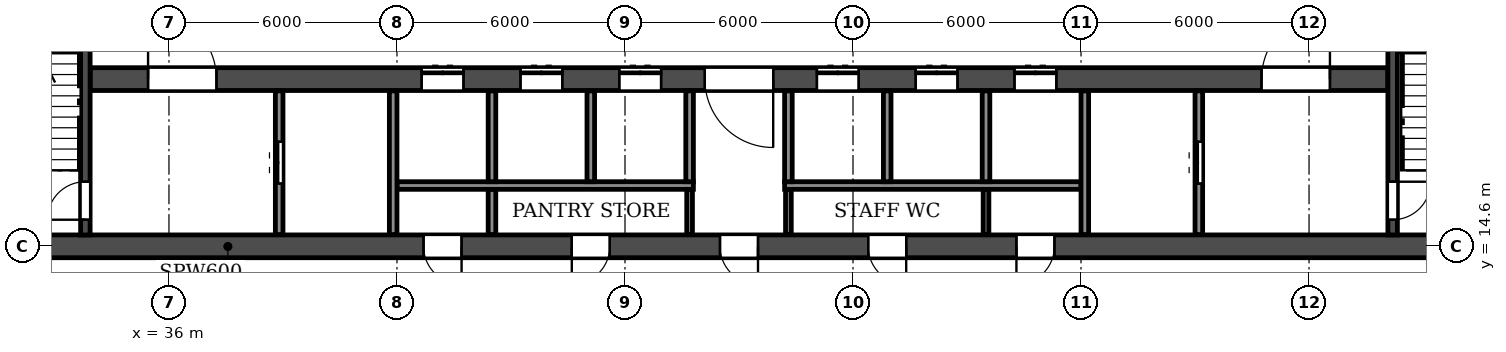
"""IFC4 building model, lengths in metres.
Left out: names, types, materials, properties, quantities, classifications, styles, units other than length and angle.
Written with IfcOpenShell. Run it as: python <this file> out.ifc"""

import sys

from ifc_helpers import new_model, si_unit, direction, frame, frame_2d, origin, place, context, subcontext, project, spatial, rectangle, extrude, element, fill, save


model = new_model("IFC4")
c1 = context("Model", 3, precision=1e-05, world=origin(), true_north=direction((0.0, 1.0)))
c2 = subcontext(c1, "Body", "Model", "MODEL_VIEW")
j1 = project(units=[si_unit("LENGTHUNIT", "METRE"), si_unit("PLANEANGLEUNIT", "RADIAN")], contexts=[c1])
p1 = place(None, origin())
s1 = spatial("IfcSite", under=j1, at=p1, CompositionType="ELEMENT")
p2 = place(p1, origin())
s2 = spatial("IfcBuilding", under=s1, at=p2, CompositionType="ELEMENT")
p3 = place(p2, frame((0.0, 0.0, 53.1)))
s3 = spatial("IfcBuildingStorey", under=s2, at=p3, CompositionType="ELEMENT", Elevation=53.1)
p4 = place(p3, frame((8.6, 14.6, 0.0), z_axis=(0.0, 0.0, 1.0), x_axis=(1.0, 0.0, 0.0)))
e1 = element("IfcWall", 1, at=p4, inside=s3, PredefinedType="SOLIDWALL", context=c2, shape_type="SweptSolid", body=[
    extrude(rectangle(XDim=84.8, YDim=0.6, at=frame_2d((42.4, 0.0))), origin(), (0.0, 0.0, 1.0), 3.05),
])
p5 = place(p4, frame((6.6, 0.0, 0.0)))
e2 = element("IfcOpeningElement", 2, at=p5, cuts=e1, PredefinedType="OPENING", context=c2, shape_type="SweptSolid", body=[
    extrude(rectangle(XDim=0.9, YDim=2.1, at=frame_2d((0.45, 1.05))), frame((0.0, 0.31, 0.0), z_axis=(0.0, -1.0, 0.0), x_axis=(1.0, 0.0, 0.0)), (0.0, 0.0, 1.0), 0.62),
])
p6 = place(p4, frame((10.3, 0.0, 0.0)))
e3 = element("IfcOpeningElement", 3, at=p6, cuts=e1, PredefinedType="OPENING", context=c2, shape_type="SweptSolid", body=[
    extrude(rectangle(XDim=1.0, YDim=2.1, at=frame_2d((0.5, 1.05))), frame((0.0, 0.31, 0.0), z_axis=(0.0, -1.0, 0.0), x_axis=(1.0, 0.0, 0.0)), (0.0, 0.0, 1.0), 0.62),
])
p7 = place(p4, frame((18.25, 0.0, 0.0)))
e4 = element("IfcOpeningElement", 4, at=p7, cuts=e1, PredefinedType="OPENING", context=c2, shape_type="SweptSolid", body=[
    extrude(rectangle(XDim=0.9, YDim=2.1, at=frame_2d((0.45, 1.05))), frame((0.0, 0.31, 0.0), z_axis=(0.0, -1.0, 0.0), x_axis=(1.0, 0.0, 0.0)), (0.0, 0.0, 1.0), 0.62),
])
p8 = place(p4, frame((22.8, 0.0, 0.0)))
e5 = element("IfcOpeningElement", 5, at=p8, cuts=e1, PredefinedType="OPENING", context=c2, shape_type="SweptSolid", body=[
    extrude(rectangle(XDim=1.0, YDim=2.1, at=frame_2d((0.5, 1.05))), frame((0.0, 0.31, 0.0), z_axis=(0.0, -1.0, 0.0), x_axis=(1.0, 0.0, 0.0)), (0.0, 0.0, 1.0), 0.62),
])
p9 = place(p4, frame((34.1, 0.0, 0.0)))
e6 = element("IfcOpeningElement", 6, at=p9, cuts=e1, PredefinedType="OPENING", context=c2, shape_type="SweptSolid", body=[
    extrude(rectangle(XDim=1.0, YDim=2.1, at=frame_2d((0.5, 1.05))), frame((0.0, 0.31, 0.0), z_axis=(0.0, -1.0, 0.0), x_axis=(1.0, 0.0, 0.0)), (0.0, 0.0, 1.0), 0.62),
])
p10 = place(p4, frame((38.0, 0.0, 0.0)))
e7 = element("IfcOpeningElement", 7, at=p10, cuts=e1, PredefinedType="OPENING", context=c2, shape_type="SweptSolid", body=[
    extrude(rectangle(XDim=1.0, YDim=2.1, at=frame_2d((0.5, 1.05))), frame((0.0, 0.31, 0.0), z_axis=(0.0, -1.0, 0.0), x_axis=(1.0, 0.0, 0.0)), (0.0, 0.0, 1.0), 0.62),
])
p11 = place(p4, frame((41.9, 0.0, 0.0)))
e8 = element("IfcOpeningElement", 8, at=p11, cuts=e1, PredefinedType="OPENING", context=c2, shape_type="SweptSolid", body=[
    extrude(rectangle(XDim=1.0, YDim=2.1, at=frame_2d((0.5, 1.05))), frame((0.0, 0.31, 0.0), z_axis=(0.0, -1.0, 0.0), x_axis=(1.0, 0.0, 0.0)), (0.0, 0.0, 1.0), 0.62),
])
p12 = place(p4, frame((45.8, 0.0, 0.0)))
e9 = element("IfcOpeningElement", 9, at=p12, cuts=e1, PredefinedType="OPENING", context=c2, shape_type="SweptSolid", body=[
    extrude(rectangle(XDim=1.0, YDim=2.1, at=frame_2d((0.5, 1.05))), frame((0.0, 0.31, 0.0), z_axis=(0.0, -1.0, 0.0), x_axis=(1.0, 0.0, 0.0)), (0.0, 0.0, 1.0), 0.62),
])
p13 = place(p4, frame((49.7, 0.0, 0.0)))
e10 = element("IfcOpeningElement", 10, at=p13, cuts=e1, PredefinedType="OPENING", context=c2, shape_type="SweptSolid", body=[
    extrude(rectangle(XDim=1.0, YDim=2.1, at=frame_2d((0.5, 1.05))), frame((0.0, 0.31, 0.0), z_axis=(0.0, -1.0, 0.0), x_axis=(1.0, 0.0, 0.0)), (0.0, 0.0, 1.0), 0.62),
])
p14 = place(p4, frame((61.0, 0.0, 0.0)))
e11 = element("IfcOpeningElement", 11, at=p14, cuts=e1, PredefinedType="OPENING", context=c2, shape_type="SweptSolid", body=[
    extrude(rectangle(XDim=1.0, YDim=2.1, at=frame_2d((0.5, 1.05))), frame((0.0, 0.31, 0.0), z_axis=(0.0, -1.0, 0.0), x_axis=(1.0, 0.0, 0.0)), (0.0, 0.0, 1.0), 0.62),
])
p15 = place(p4, frame((65.65, 0.0, 0.0)))
e12 = element("IfcOpeningElement", 12, at=p15, cuts=e1, PredefinedType="OPENING", context=c2, shape_type="SweptSolid", body=[
    extrude(rectangle(XDim=0.9, YDim=2.1, at=frame_2d((0.45, 1.05))), frame((0.0, 0.31, 0.0), z_axis=(0.0, -1.0, 0.0), x_axis=(1.0, 0.0, 0.0)), (0.0, 0.0, 1.0), 0.62),
])
p16 = place(p4, frame((73.5, 0.0, 0.0)))
e13 = element("IfcOpeningElement", 13, at=p16, cuts=e1, PredefinedType="OPENING", context=c2, shape_type="SweptSolid", body=[
    extrude(rectangle(XDim=1.0, YDim=2.1, at=frame_2d((0.5, 1.05))), frame((0.0, 0.31, 0.0), z_axis=(0.0, -1.0, 0.0), x_axis=(1.0, 0.0, 0.0)), (0.0, 0.0, 1.0), 0.62),
])
p17 = place(p4, frame((77.3, 0.0, 0.0)))
e14 = element("IfcOpeningElement", 14, at=p17, cuts=e1, PredefinedType="OPENING", context=c2, shape_type="SweptSolid", body=[
    extrude(rectangle(XDim=0.9, YDim=2.1, at=frame_2d((0.45, 1.05))), frame((0.0, 0.31, 0.0), z_axis=(0.0, -1.0, 0.0), x_axis=(1.0, 0.0, 0.0)), (0.0, 0.0, 1.0), 0.62),
])
p18 = place(p3, frame((33.925, 19.0, 0.0), z_axis=(0.0, 0.0, 1.0), x_axis=(1.0, 0.0, 0.0)))
e15 = element("IfcWall", 15, at=p18, inside=s3, PredefinedType="SOLIDWALL", context=c2, shape_type="SweptSolid", body=[
    extrude(rectangle(XDim=34.15, YDim=0.6, at=frame_2d((17.075, 0.0))), origin(), (0.0, 0.0, 1.0), 3.05),
])
p19 = place(p18, frame((16.175, 0.0, 0.0)))
e16 = element("IfcOpeningElement", 16, at=p19, cuts=e15, PredefinedType="OPENING", context=c2, shape_type="SweptSolid", body=[
    extrude(rectangle(XDim=1.8, YDim=2.1, at=frame_2d((0.9, 1.05))), frame((0.0, 0.31, 0.0), z_axis=(0.0, -1.0, 0.0), x_axis=(1.0, 0.0, 0.0)), (0.0, 0.0, 1.0), 0.62),
])
p20 = place(p18, frame((1.525, 0.0, 0.0)))
e17 = element("IfcOpeningElement", 17, at=p20, cuts=e15, PredefinedType="OPENING", context=c2, shape_type="SweptSolid", body=[
    extrude(rectangle(XDim=1.8, YDim=2.1, at=frame_2d((0.9, 1.05))), frame((0.0, 0.31, 0.0), z_axis=(0.0, -1.0, 0.0), x_axis=(1.0, 0.0, 0.0)), (0.0, 0.0, 1.0), 0.62),
])
p21 = place(p18, frame((8.725, 0.0, 0.0)))
e18 = element("IfcOpeningElement", 18, at=p21, cuts=e15, PredefinedType="OPENING", context=c2, shape_type="SweptSolid", body=[
    extrude(rectangle(XDim=1.1, YDim=2.1, at=frame_2d((0.55, 1.05))), frame((0.0, 0.31, 0.0), z_axis=(0.0, -1.0, 0.0), x_axis=(1.0, 0.0, 0.0)), (0.0, 0.0, 1.0), 0.62),
])
p22 = place(p18, frame((11.325, 0.0, 0.0)))
e19 = element("IfcOpeningElement", 19, at=p22, cuts=e15, PredefinedType="OPENING", context=c2, shape_type="SweptSolid", body=[
    extrude(rectangle(XDim=1.1, YDim=2.1, at=frame_2d((0.55, 1.05))), frame((0.0, 0.31, 0.0), z_axis=(0.0, -1.0, 0.0), x_axis=(1.0, 0.0, 0.0)), (0.0, 0.0, 1.0), 0.62),
])
p23 = place(p18, frame((13.925, 0.0, 0.0)))
e20 = element("IfcOpeningElement", 20, at=p23, cuts=e15, PredefinedType="OPENING", context=c2, shape_type="SweptSolid", body=[
    extrude(rectangle(XDim=1.1, YDim=2.1, at=frame_2d((0.55, 1.05))), frame((0.0, 0.31, 0.0), z_axis=(0.0, -1.0, 0.0), x_axis=(1.0, 0.0, 0.0)), (0.0, 0.0, 1.0), 0.62),
])
p24 = place(p18, frame((19.125, 0.0, 0.0)))
e21 = element("IfcOpeningElement", 21, at=p24, cuts=e15, PredefinedType="OPENING", context=c2, shape_type="SweptSolid", body=[
    extrude(rectangle(XDim=1.1, YDim=2.1, at=frame_2d((0.55, 1.05))), frame((0.0, 0.31, 0.0), z_axis=(0.0, -1.0, 0.0), x_axis=(1.0, 0.0, 0.0)), (0.0, 0.0, 1.0), 0.62),
])
p25 = place(p18, frame((21.725, 0.0, 0.0)))
e22 = element("IfcOpeningElement", 22, at=p25, cuts=e15, PredefinedType="OPENING", context=c2, shape_type="SweptSolid", body=[
    extrude(rectangle(XDim=1.1, YDim=2.1, at=frame_2d((0.55, 1.05))), frame((0.0, 0.31, 0.0), z_axis=(0.0, -1.0, 0.0), x_axis=(1.0, 0.0, 0.0)), (0.0, 0.0, 1.0), 0.62),
])
p26 = place(p18, frame((24.325, 0.0, 0.0)))
e23 = element("IfcOpeningElement", 23, at=p26, cuts=e15, PredefinedType="OPENING", context=c2, shape_type="SweptSolid", body=[
    extrude(rectangle(XDim=1.1, YDim=2.1, at=frame_2d((0.55, 1.05))), frame((0.0, 0.31, 0.0), z_axis=(0.0, -1.0, 0.0), x_axis=(1.0, 0.0, 0.0)), (0.0, 0.0, 1.0), 0.62),
])
p27 = place(p18, frame((30.825, 0.0, 0.0)))
e24 = element("IfcOpeningElement", 24, at=p27, cuts=e15, PredefinedType="OPENING", context=c2, shape_type="SweptSolid", body=[
    extrude(rectangle(XDim=1.8, YDim=2.1, at=frame_2d((0.9, 1.05))), frame((0.0, 0.31, 0.0), z_axis=(0.0, -1.0, 0.0), x_axis=(1.0, 0.0, 0.0)), (0.0, 0.0, 1.0), 0.62),
])
p28 = place(p3, frame((33.8, 14.9, 0.0), z_axis=(0.0, 0.0, 1.0), x_axis=(0.0, 1.0, 0.0)))
e25 = element("IfcWall", 25, at=p28, inside=s3, PredefinedType="SOLIDWALL", context=c2, shape_type="SweptSolid", body=[
    extrude(rectangle(XDim=7.575, YDim=0.25, at=frame_2d((3.788, 0.0))), origin(), (0.0, 0.0, 1.0), 3.05),
])
p29 = place(p28, frame((0.4, 0.0, 0.0)))
e26 = element("IfcOpeningElement", 26, at=p29, cuts=e25, PredefinedType="OPENING", context=c2, shape_type="SweptSolid", body=[
    extrude(rectangle(XDim=1.0, YDim=2.1, at=frame_2d((0.5, 1.05))), frame((0.0, 0.135, 0.0), z_axis=(0.0, -1.0, 0.0), x_axis=(1.0, 0.0, 0.0)), (0.0, 0.0, 1.0), 0.27),
])
p30 = place(p3, frame((68.2, 14.9, 0.0), z_axis=(0.0, 0.0, 1.0), x_axis=(0.0, 1.0, 0.0)))
e27 = element("IfcWall", 27, at=p30, inside=s3, PredefinedType="SOLIDWALL", context=c2, shape_type="SweptSolid", body=[
    extrude(rectangle(XDim=7.575, YDim=0.25, at=frame_2d((3.788, 0.0))), origin(), (0.0, 0.0, 1.0), 3.05),
])
p31 = place(p30, frame((0.4, 0.0, 0.0)))
e28 = element("IfcOpeningElement", 28, at=p31, cuts=e27, PredefinedType="OPENING", context=c2, shape_type="SweptSolid", body=[
    extrude(rectangle(XDim=1.0, YDim=2.1, at=frame_2d((0.5, 1.05))), frame((0.0, 0.135, 0.0), z_axis=(0.0, -1.0, 0.0), x_axis=(1.0, 0.0, 0.0)), (0.0, 0.0, 1.0), 0.27),
])
for number, where, z_axis, x_axis in (
    (29, (49.7, 14.91, 0.0), (0.0, 0.0, 1.0), (0.0, 1.0, 0.0)),
    (30, (52.3, 14.91, 0.0), (0.0, 0.0, 1.0), (0.0, 1.0, 0.0)),
    (31, (57.5, 14.91, 0.0), (0.0, 0.0, 1.0), (0.0, 1.0, 0.0)),
):
    element("IfcWall", number, at=place(p3, frame(where, z_axis=z_axis, x_axis=x_axis)), inside=s3, PredefinedType="PARTITIONING", context=c2, shape_type="SweptSolid", body=[
        extrude(rectangle(XDim=1.19, YDim=0.15, at=frame_2d((0.595, 0.0))), origin(), (0.0, 0.0, 1.0), 3.05),
    ])
p32 = place(p3, frame((44.5, 14.91, 0.0), z_axis=(0.0, 0.0, 1.0), x_axis=(0.0, 1.0, 0.0)))
e32 = element("IfcWall", 32, at=p32, inside=s3, PredefinedType="PARTITIONING", context=c2, shape_type="SweptSolid", body=[
    extrude(rectangle(XDim=1.19, YDim=0.2, at=frame_2d((0.595, 0.0))), origin(), (0.0, 0.0, 1.0), 3.05),
])
for number, where, z_axis, x_axis in (
    (33, (42.0, 16.2, 0.0), (0.0, 0.0, 1.0), (1.0, 0.0, 0.0)),
    (34, (52.2, 16.2, 0.0), (0.0, 0.0, 1.0), (1.0, 0.0, 0.0)),
):
    element("IfcWall", number, at=place(p3, frame(where, z_axis=z_axis, x_axis=x_axis)), inside=s3, PredefinedType="PARTITIONING", context=c2, shape_type="SweptSolid", body=[
        extrude(rectangle(XDim=7.8, YDim=0.2, at=frame_2d((3.9, 0.0))), origin(), (0.0, 0.0, 1.0), 3.05),
    ])
p33 = place(p3, frame((38.9, 14.91, 0.0), z_axis=(0.0, 0.0, 1.0), x_axis=(0.0, 1.0, 0.0)))
e35 = element("IfcWall", 35, at=p33, inside=s3, PredefinedType="PARTITIONING", context=c2, shape_type="SweptSolid", body=[
    extrude(rectangle(XDim=3.78, YDim=0.2, at=frame_2d((1.89, 0.0))), origin(), (0.0, 0.0, 1.0), 3.05),
])
p34 = place(p33, frame((1.34, 0.0, 0.0)))
e36 = element("IfcOpeningElement", 36, at=p34, cuts=e35, PredefinedType="OPENING", context=c2, shape_type="SweptSolid", body=[
    extrude(rectangle(XDim=1.1, YDim=2.1, at=frame_2d((0.55, 1.05))), frame((0.0, 0.11, 0.0), z_axis=(0.0, -1.0, 0.0), x_axis=(1.0, 0.0, 0.0)), (0.0, 0.0, 1.0), 0.22),
])
p35 = place(p3, frame((41.9, 14.91, 0.0), z_axis=(0.0, 0.0, 1.0), x_axis=(0.0, 1.0, 0.0)))
e37 = element("IfcWall", 37, at=p35, inside=s3, PredefinedType="PARTITIONING", context=c2, shape_type="SweptSolid", body=[
    extrude(rectangle(XDim=3.78, YDim=0.2, at=frame_2d((1.89, 0.0))), origin(), (0.0, 0.0, 1.0), 3.05),
])
for number, where, z_axis, x_axis in (
    (38, (44.5, 16.3, 0.0), (0.0, 0.0, 1.0), (0.0, 1.0, 0.0)),
    (39, (47.1, 16.3, 0.0), (0.0, 0.0, 1.0), (0.0, 1.0, 0.0)),
    (40, (49.7, 16.3, 0.0), (0.0, 0.0, 1.0), (0.0, 1.0, 0.0)),
    (41, (52.3, 16.3, 0.0), (0.0, 0.0, 1.0), (0.0, 1.0, 0.0)),
    (42, (54.9, 16.3, 0.0), (0.0, 0.0, 1.0), (0.0, 1.0, 0.0)),
    (43, (57.5, 16.3, 0.0), (0.0, 0.0, 1.0), (0.0, 1.0, 0.0)),
):
    element("IfcWall", number, at=place(p3, frame(where, z_axis=z_axis, x_axis=x_axis)), inside=s3, PredefinedType="PARTITIONING", context=c2, shape_type="SweptSolid", body=[
        extrude(rectangle(XDim=2.39, YDim=0.2, at=frame_2d((1.195, 0.0))), origin(), (0.0, 0.0, 1.0), 3.05),
    ])
p36 = place(p3, frame((60.1, 14.91, 0.0), z_axis=(0.0, 0.0, 1.0), x_axis=(0.0, 1.0, 0.0)))
e44 = element("IfcWall", 44, at=p36, inside=s3, PredefinedType="PARTITIONING", context=c2, shape_type="SweptSolid", body=[
    extrude(rectangle(XDim=3.78, YDim=0.2, at=frame_2d((1.89, 0.0))), origin(), (0.0, 0.0, 1.0), 3.05),
])
p37 = place(p3, frame((63.1, 14.91, 0.0), z_axis=(0.0, 0.0, 1.0), x_axis=(0.0, 1.0, 0.0)))
e45 = element("IfcWall", 45, at=p37, inside=s3, PredefinedType="PARTITIONING", context=c2, shape_type="SweptSolid", body=[
    extrude(rectangle(XDim=3.78, YDim=0.2, at=frame_2d((1.89, 0.0))), origin(), (0.0, 0.0, 1.0), 3.05),
])
p38 = place(p37, frame((1.34, 0.0, 0.0)))
e46 = element("IfcOpeningElement", 46, at=p38, cuts=e45, PredefinedType="OPENING", context=c2, shape_type="SweptSolid", body=[
    extrude(rectangle(XDim=1.1, YDim=2.1, at=frame_2d((0.55, 1.05))), frame((0.0, 0.11, 0.0), z_axis=(0.0, -1.0, 0.0), x_axis=(1.0, 0.0, 0.0)), (0.0, 0.0, 1.0), 0.22),
])
p39 = place(p9, frame((1.0, 0.0, 0.0), z_axis=(0.0, 0.0, 1.0), x_axis=(-1.0, 0.0, 0.0)))
e47 = element("IfcDoor", 47, at=p39, inside=s3, OperationType="SINGLE_SWING_LEFT", PredefinedType="DOOR", context=c2, shape_type="SweptSolid", body=[
    extrude(rectangle(XDim=1.0, YDim=2.1, at=frame_2d((0.5, 1.05))), frame((0.0, 0.025, 0.0), z_axis=(0.0, -1.0, 0.0), x_axis=(1.0, 0.0, 0.0)), (0.0, 0.0, 1.0), 0.05),
])
fill(e6, e47)
p40 = place(p10, frame((1.0, 0.0, 0.0), z_axis=(0.0, 0.0, 1.0), x_axis=(-1.0, 0.0, 0.0)))
e48 = element("IfcDoor", 48, at=p40, inside=s3, OperationType="SINGLE_SWING_RIGHT", PredefinedType="DOOR", context=c2, shape_type="SweptSolid", body=[
    extrude(rectangle(XDim=1.0, YDim=2.1, at=frame_2d((0.5, 1.05))), frame((0.0, 0.025, 0.0), z_axis=(0.0, -1.0, 0.0), x_axis=(1.0, 0.0, 0.0)), (0.0, 0.0, 1.0), 0.05),
])
fill(e7, e48)
p41 = place(p11, frame((1.0, 0.0, 0.0), z_axis=(0.0, 0.0, 1.0), x_axis=(-1.0, 0.0, 0.0)))
e49 = element("IfcDoor", 49, at=p41, inside=s3, OperationType="SINGLE_SWING_LEFT", PredefinedType="DOOR", context=c2, shape_type="SweptSolid", body=[
    extrude(rectangle(XDim=1.0, YDim=2.1, at=frame_2d((0.5, 1.05))), frame((0.0, 0.025, 0.0), z_axis=(0.0, -1.0, 0.0), x_axis=(1.0, 0.0, 0.0)), (0.0, 0.0, 1.0), 0.05),
])
fill(e8, e49)
p42 = place(p12, frame((1.0, 0.0, 0.0), z_axis=(0.0, 0.0, 1.0), x_axis=(-1.0, 0.0, 0.0)))
e50 = element("IfcDoor", 50, at=p42, inside=s3, OperationType="SINGLE_SWING_LEFT", PredefinedType="DOOR", context=c2, shape_type="SweptSolid", body=[
    extrude(rectangle(XDim=1.0, YDim=2.1, at=frame_2d((0.5, 1.05))), frame((0.0, 0.025, 0.0), z_axis=(0.0, -1.0, 0.0), x_axis=(1.0, 0.0, 0.0)), (0.0, 0.0, 1.0), 0.05),
])
fill(e9, e50)
p43 = place(p13, frame((1.0, 0.0, 0.0), z_axis=(0.0, 0.0, 1.0), x_axis=(-1.0, 0.0, 0.0)))
e51 = element("IfcDoor", 51, at=p43, inside=s3, OperationType="SINGLE_SWING_RIGHT", PredefinedType="DOOR", context=c2, shape_type="SweptSolid", body=[
    extrude(rectangle(XDim=1.0, YDim=2.1, at=frame_2d((0.5, 1.05))), frame((0.0, 0.025, 0.0), z_axis=(0.0, -1.0, 0.0), x_axis=(1.0, 0.0, 0.0)), (0.0, 0.0, 1.0), 0.05),
])
fill(e10, e51)
p44 = place(p38, origin())
e52 = element("IfcDoor", 52, at=p44, inside=s3, OperationType="DOUBLE_DOOR_SLIDING", PredefinedType="DOOR", context=c2, shape_type="SweptSolid", body=[
    extrude(rectangle(XDim=1.1, YDim=2.1, at=frame_2d((0.55, 1.05))), frame((0.0, 0.025, 0.0), z_axis=(0.0, -1.0, 0.0), x_axis=(1.0, 0.0, 0.0)), (0.0, 0.0, 1.0), 0.05),
])
fill(e46, e52)
p45 = place(p31, frame((1.0, 0.0, 0.0), z_axis=(0.0, 0.0, 1.0), x_axis=(-1.0, 0.0, 0.0)))
e53 = element("IfcDoor", 53, at=p45, inside=s3, OperationType="SINGLE_SWING_LEFT", PredefinedType="DOOR", context=c2, shape_type="SweptSolid", body=[
    extrude(rectangle(XDim=1.0, YDim=2.1, at=frame_2d((0.5, 1.05))), frame((0.0, 0.025, 0.0), z_axis=(0.0, -1.0, 0.0), x_axis=(1.0, 0.0, 0.0)), (0.0, 0.0, 1.0), 0.05),
])
fill(e28, e53)
p46 = place(p29, origin())
e54 = element("IfcDoor", 54, at=p46, inside=s3, OperationType="SINGLE_SWING_LEFT", PredefinedType="DOOR", context=c2, shape_type="SweptSolid", body=[
    extrude(rectangle(XDim=1.0, YDim=2.1, at=frame_2d((0.5, 1.05))), frame((0.0, 0.025, 0.0), z_axis=(0.0, -1.0, 0.0), x_axis=(1.0, 0.0, 0.0)), (0.0, 0.0, 1.0), 0.05),
])
fill(e26, e54)
p47 = place(p34, origin())
e55 = element("IfcDoor", 55, at=p47, inside=s3, OperationType="DOUBLE_DOOR_SLIDING", PredefinedType="DOOR", context=c2, shape_type="SweptSolid", body=[
    extrude(rectangle(XDim=1.1, YDim=2.1, at=frame_2d((0.55, 1.05))), frame((0.0, 0.025, 0.0), z_axis=(0.0, -1.0, 0.0), x_axis=(1.0, 0.0, 0.0)), (0.0, 0.0, 1.0), 0.05),
])
fill(e36, e55)
p48 = place(p19, frame((1.8, 0.0, 0.0), z_axis=(0.0, 0.0, 1.0), x_axis=(-1.0, 0.0, 0.0)))
e56 = element("IfcDoor", 56, at=p48, inside=s3, OperationType="DOUBLE_DOOR_SINGLE_SWING", PredefinedType="DOOR", context=c2, shape_type="SweptSolid", body=[
    extrude(rectangle(XDim=1.8, YDim=2.1, at=frame_2d((0.9, 1.05))), frame((0.0, 0.025, 0.0), z_axis=(0.0, -1.0, 0.0), x_axis=(1.0, 0.0, 0.0)), (0.0, 0.0, 1.0), 0.05),
])
fill(e16, e56)
p49 = place(p20, origin())
e57 = element("IfcDoor", 57, at=p49, inside=s3, OperationType="DOUBLE_DOOR_SINGLE_SWING", PredefinedType="DOOR", context=c2, shape_type="SweptSolid", body=[
    extrude(rectangle(XDim=1.8, YDim=2.1, at=frame_2d((0.9, 1.05))), frame((0.0, 0.025, 0.0), z_axis=(0.0, -1.0, 0.0), x_axis=(1.0, 0.0, 0.0)), (0.0, 0.0, 1.0), 0.05),
])
fill(e17, e57)
p50 = place(p21, origin())
e58 = element("IfcDoor", 58, at=p50, inside=s3, OperationType="DOUBLE_DOOR_SLIDING", PredefinedType="DOOR", context=c2, shape_type="SweptSolid", body=[
    extrude(rectangle(XDim=1.1, YDim=2.1, at=frame_2d((0.55, 1.05))), frame((0.0, 0.025, 0.0), z_axis=(0.0, -1.0, 0.0), x_axis=(1.0, 0.0, 0.0)), (0.0, 0.0, 1.0), 0.05),
])
fill(e18, e58)
p51 = place(p22, origin())
e59 = element("IfcDoor", 59, at=p51, inside=s3, OperationType="DOUBLE_DOOR_SLIDING", PredefinedType="DOOR", context=c2, shape_type="SweptSolid", body=[
    extrude(rectangle(XDim=1.1, YDim=2.1, at=frame_2d((0.55, 1.05))), frame((0.0, 0.025, 0.0), z_axis=(0.0, -1.0, 0.0), x_axis=(1.0, 0.0, 0.0)), (0.0, 0.0, 1.0), 0.05),
])
fill(e19, e59)
p52 = place(p23, origin())
e60 = element("IfcDoor", 60, at=p52, inside=s3, OperationType="DOUBLE_DOOR_SLIDING", PredefinedType="DOOR", context=c2, shape_type="SweptSolid", body=[
    extrude(rectangle(XDim=1.1, YDim=2.1, at=frame_2d((0.55, 1.05))), frame((0.0, 0.025, 0.0), z_axis=(0.0, -1.0, 0.0), x_axis=(1.0, 0.0, 0.0)), (0.0, 0.0, 1.0), 0.05),
])
fill(e20, e60)
p53 = place(p24, origin())
e61 = element("IfcDoor", 61, at=p53, inside=s3, OperationType="DOUBLE_DOOR_SLIDING", PredefinedType="DOOR", context=c2, shape_type="SweptSolid", body=[
    extrude(rectangle(XDim=1.1, YDim=2.1, at=frame_2d((0.55, 1.05))), frame((0.0, 0.025, 0.0), z_axis=(0.0, -1.0, 0.0), x_axis=(1.0, 0.0, 0.0)), (0.0, 0.0, 1.0), 0.05),
])
fill(e21, e61)
p54 = place(p25, origin())
e62 = element("IfcDoor", 62, at=p54, inside=s3, OperationType="DOUBLE_DOOR_SLIDING", PredefinedType="DOOR", context=c2, shape_type="SweptSolid", body=[
    extrude(rectangle(XDim=1.1, YDim=2.1, at=frame_2d((0.55, 1.05))), frame((0.0, 0.025, 0.0), z_axis=(0.0, -1.0, 0.0), x_axis=(1.0, 0.0, 0.0)), (0.0, 0.0, 1.0), 0.05),
])
fill(e22, e62)
p55 = place(p26, origin())
e63 = element("IfcDoor", 63, at=p55, inside=s3, OperationType="DOUBLE_DOOR_SLIDING", PredefinedType="DOOR", context=c2, shape_type="SweptSolid", body=[
    extrude(rectangle(XDim=1.1, YDim=2.1, at=frame_2d((0.55, 1.05))), frame((0.0, 0.025, 0.0), z_axis=(0.0, -1.0, 0.0), x_axis=(1.0, 0.0, 0.0)), (0.0, 0.0, 1.0), 0.05),
])
fill(e23, e63)
p56 = place(p27, origin())
e64 = element("IfcDoor", 64, at=p56, inside=s3, OperationType="DOUBLE_DOOR_SINGLE_SWING", PredefinedType="DOOR", context=c2, shape_type="SweptSolid", body=[
    extrude(rectangle(XDim=1.8, YDim=2.1, at=frame_2d((0.9, 1.05))), frame((0.0, 0.025, 0.0), z_axis=(0.0, -1.0, 0.0), x_axis=(1.0, 0.0, 0.0)), (0.0, 0.0, 1.0), 0.05),
])
fill(e24, e64)
save(model, sys.argv[1])
